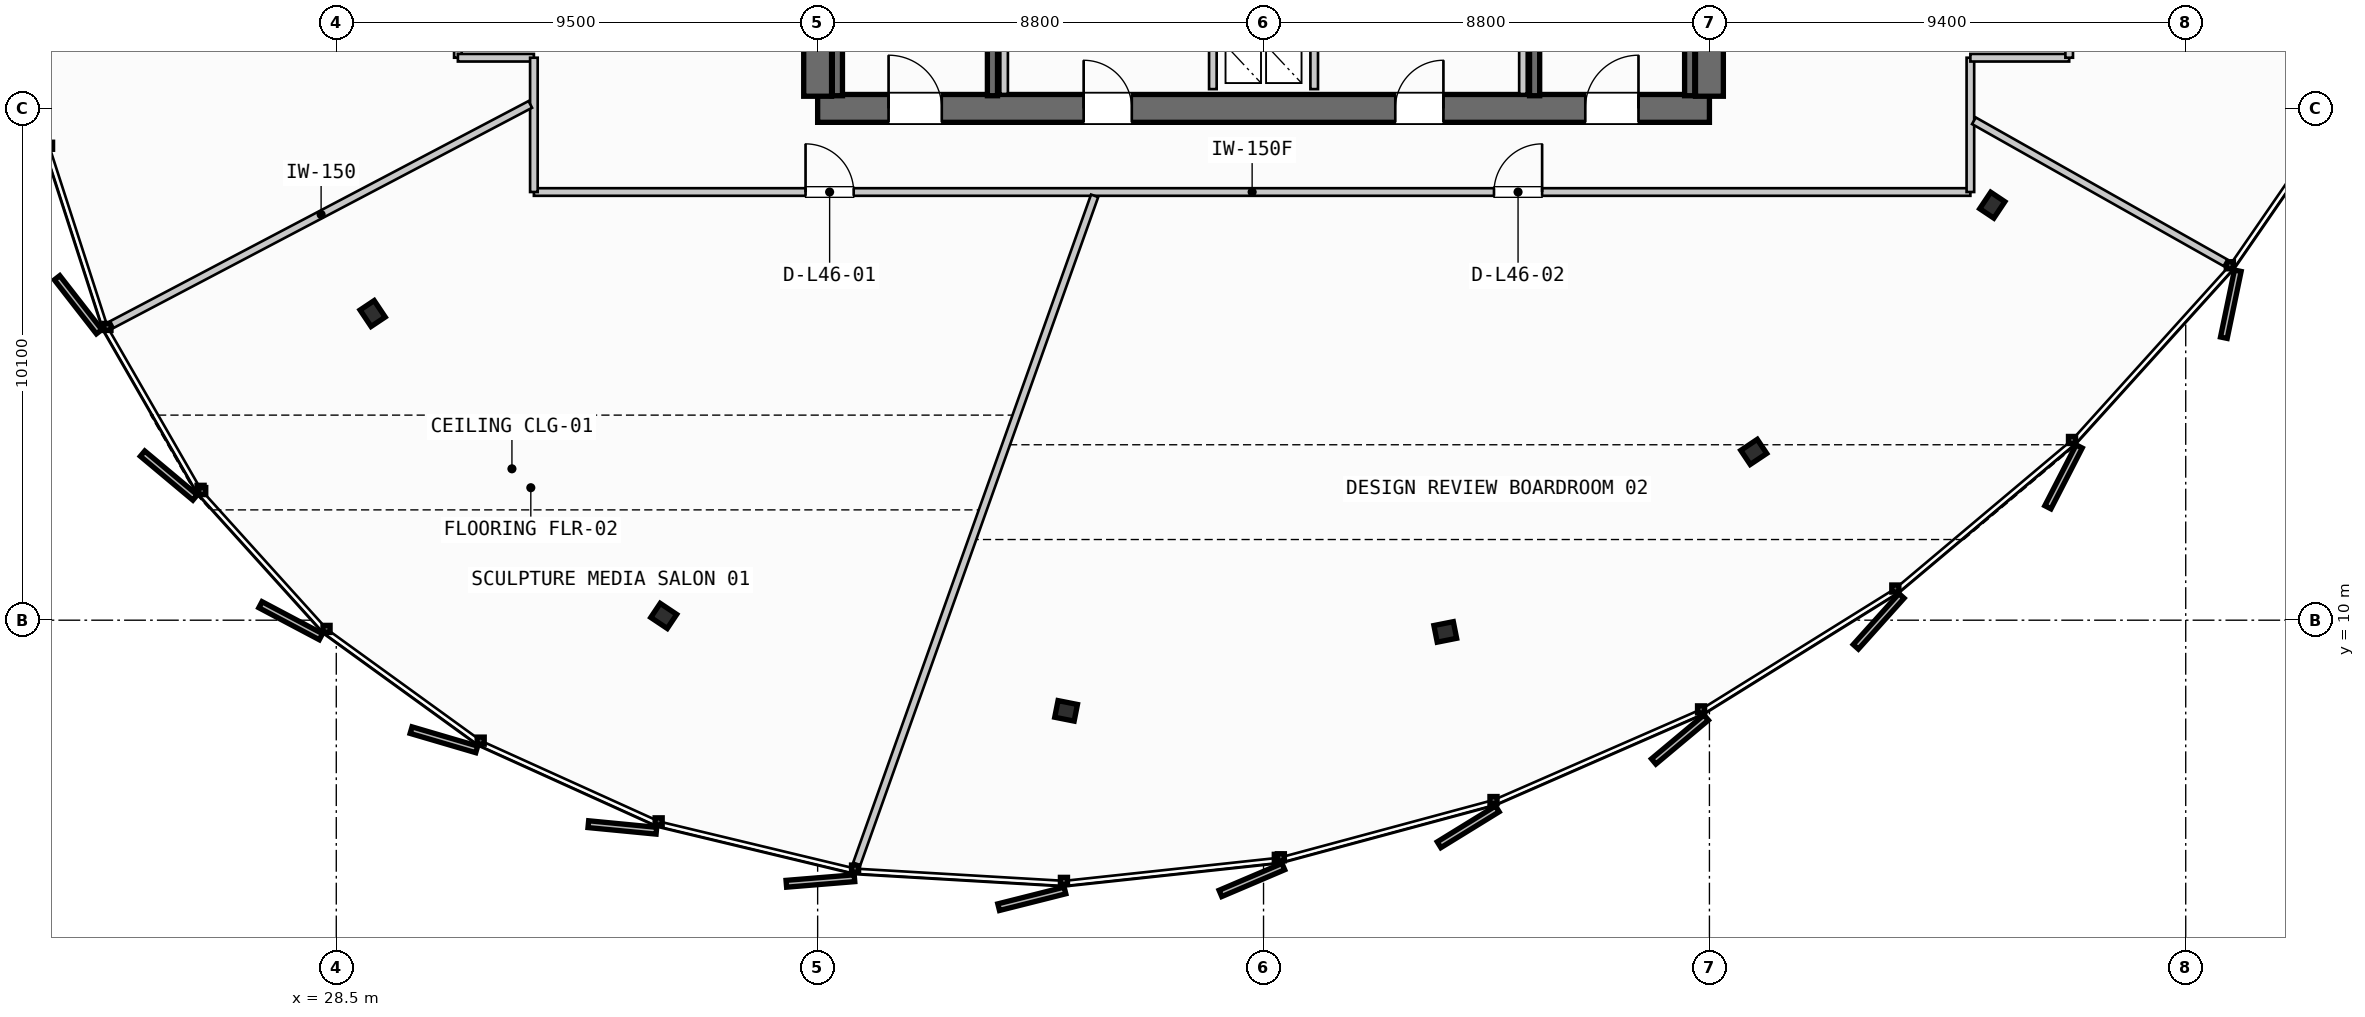
"""IFC4 building model, lengths in metres.
Left out: names, types, materials, properties, quantities, classifications, styles, units other than length and angle.
Written with IfcOpenShell. Run it as: python <this file> out.ifc"""

import sys

from ifc_helpers import new_model, si_unit, direction, frame, frame_2d, origin, origin_2d, place, context, subcontext, project, spatial, rectangle, i_section, extrude, source, transform, mapped, element, fill, save


model = new_model("IFC4")
c1 = context("Model", 3, precision=1e-05, world=origin(), true_north=direction((0.0, 1.0)))
c2 = subcontext(c1, "Body", "Model", "MODEL_VIEW")
j1 = project(units=[si_unit("LENGTHUNIT", "METRE"), si_unit("PLANEANGLEUNIT", "RADIAN")], contexts=[c1])
p1 = place(None, origin())
s1 = spatial("IfcSite", under=j1, at=p1, CompositionType="ELEMENT")
p2 = place(p1, origin())
s2 = spatial("IfcBuilding", under=s1, at=p2, CompositionType="ELEMENT")
p3 = place(p2, frame((0.0, 0.0, 179.9)))
s3 = spatial("IfcBuildingStorey", under=s2, at=p3, CompositionType="ELEMENT", Elevation=179.9)
p4 = place(p3, frame((38.0, 20.1, 0.0), z_axis=(0.0, 0.0, 1.0), x_axis=(1.0, 0.0, 0.0)))
e1 = element("IfcWall", 1, at=p4, inside=s3, PredefinedType="SHEAR", context=c2, shape_type="SweptSolid", body=[
    extrude(rectangle(XDim=17.6, YDim=0.55, at=frame_2d((8.8, 0.0))), origin(), (0.0, 0.0, 1.0), 3.26),
])
p5 = place(p4, frame((1.4, 0.0, 0.0)))
e2 = element("IfcOpeningElement", 2, at=p5, cuts=e1, PredefinedType="OPENING", context=c2, shape_type="SweptSolid", body=[
    extrude(rectangle(XDim=1.05, YDim=2.15, at=frame_2d((0.525, 1.075))), frame((0.0, 0.285, 0.0), z_axis=(0.0, -1.0, 0.0), x_axis=(1.0, 0.0, 0.0)), (0.0, 0.0, 1.0), 0.57),
])
p6 = place(p4, frame((15.15, 0.0, 0.0)))
e3 = element("IfcOpeningElement", 3, at=p6, cuts=e1, PredefinedType="OPENING", context=c2, shape_type="SweptSolid", body=[
    extrude(rectangle(XDim=1.05, YDim=2.15, at=frame_2d((0.525, 1.075))), frame((0.0, 0.285, 0.0), z_axis=(0.0, -1.0, 0.0), x_axis=(1.0, 0.0, 0.0)), (0.0, 0.0, 1.0), 0.57),
])
p7 = place(p4, frame((5.25, 0.0, 0.0)))
e4 = element("IfcOpeningElement", 4, at=p7, cuts=e1, PredefinedType="OPENING", context=c2, shape_type="SweptSolid", body=[
    extrude(rectangle(XDim=0.95, YDim=2.15, at=frame_2d((0.475, 1.075))), frame((0.0, 0.285, 0.0), z_axis=(0.0, -1.0, 0.0), x_axis=(1.0, 0.0, 0.0)), (0.0, 0.0, 1.0), 0.57),
])
p8 = place(p4, frame((11.4, 0.0, 0.0)))
e5 = element("IfcOpeningElement", 5, at=p8, cuts=e1, PredefinedType="OPENING", context=c2, shape_type="SweptSolid", body=[
    extrude(rectangle(XDim=0.95, YDim=2.15, at=frame_2d((0.475, 1.075))), frame((0.0, 0.285, 0.0), z_axis=(0.0, -1.0, 0.0), x_axis=(1.0, 0.0, 0.0)), (0.0, 0.0, 1.0), 0.57),
])
p9 = place(p3, frame((38.0, 35.26, 0.0), z_axis=(0.0, 0.0, 1.0), x_axis=(0.0, -1.0, 0.0)))
e6 = element("IfcWall", 6, at=p9, inside=s3, PredefinedType="SHEAR", context=c2, shape_type="SweptSolid", body=[
    extrude(rectangle(XDim=14.92, YDim=0.55, at=frame_2d((7.46, 0.0))), origin(), (0.0, 0.0, 1.0), 3.26),
])
p10 = place(p9, frame((5.21, 0.0, 0.0)))
e7 = element("IfcOpeningElement", 7, at=p10, cuts=e6, PredefinedType="OPENING", context=c2, shape_type="SweptSolid", body=[
    extrude(rectangle(XDim=1.1, YDim=2.2, at=frame_2d((0.55, 1.1))), frame((0.0, 0.285, 0.0), z_axis=(0.0, -1.0, 0.0), x_axis=(1.0, 0.0, 0.0)), (0.0, 0.0, 1.0), 0.57),
])
p11 = place(p3, frame((55.6, 20.34, 0.0), z_axis=(0.0, 0.0, 1.0), x_axis=(0.0, 1.0, 0.0)))
e8 = element("IfcWall", 8, at=p11, inside=s3, PredefinedType="SHEAR", context=c2, shape_type="SweptSolid", body=[
    extrude(rectangle(XDim=14.92, YDim=0.55, at=frame_2d((7.46, 0.0))), origin(), (0.0, 0.0, 1.0), 3.26),
])
p12 = place(p11, frame((12.71, 0.0, 0.0)))
e9 = element("IfcOpeningElement", 9, at=p12, cuts=e8, PredefinedType="OPENING", context=c2, shape_type="SweptSolid", body=[
    extrude(rectangle(XDim=1.05, YDim=2.15, at=frame_2d((0.525, 1.075))), frame((0.0, 0.285, 0.0), z_axis=(0.0, -1.0, 0.0), x_axis=(1.0, 0.0, 0.0)), (0.0, 0.0, 1.0), 0.57),
])
p13 = place(p11, frame((8.61, 0.0, 0.0)))
e10 = element("IfcOpeningElement", 10, at=p13, cuts=e8, PredefinedType="OPENING", context=c2, shape_type="SweptSolid", body=[
    extrude(rectangle(XDim=1.1, YDim=2.2, at=frame_2d((0.55, 1.1))), frame((0.0, 0.285, 0.0), z_axis=(0.0, -1.0, 0.0), x_axis=(1.0, 0.0, 0.0)), (0.0, 0.0, 1.0), 0.57),
])
m1 = source(origin(), c2, "Body", "SweptSolid", [
    extrude(i_section(OverallWidth=0.391, OverallDepth=0.335, WebThickness=0.023, FlangeThickness=0.034, FilletRadius=0.015, at=origin_2d()), origin(), (0.0, 0.0, 1.0), 3.26),
])
for number, where, z_axis, x_axis in (
    (11, (29.218, 16.052, 0.0), (0.0, 0.0, 1.0), (-0.831, -0.556, 0.0)),
    (12, (34.963, 10.084, 0.0), (0.0, 0.0, 1.0), (-0.556, -0.831, 0.0)),
    (13, (42.904, 8.211, 0.0), (0.0, 0.0, 1.0), (-0.195, -0.981, 0.0)),
    (14, (50.387, 9.769, 0.0), (0.0, 0.0, 1.0), (0.195, -0.981, 0.0)),
    (15, (56.475, 13.321, 0.0), (0.0, 0.0, 1.0), (0.556, -0.831, 0.0)),
    (16, (61.183, 18.19, 0.0), (0.0, 0.0, 1.0), (0.831, -0.556, 0.0)),
):
    element("IfcColumn", number, at=place(p3, frame(where, z_axis=z_axis, x_axis=x_axis)), inside=s3, PredefinedType="COLUMN", context=c2, shape_type="MappedRepresentation", body=[
        mapped(m1, transform((0.0, 0.0, 0.0), scale=1.0)),
    ])
for number, where, z_axis, x_axis in (
    (17, (41.45, 27.7, 0.0), (0.0, 0.0, 1.0), (0.0, -1.0, 0.0)),
    (18, (38.39, 20.35, 0.0), (0.0, 0.0, 1.0), (0.0, 1.0, 0.0)),
    (19, (55.21, 27.7, 0.0), (0.0, 0.0, 1.0), (0.0, -1.0, 0.0)),
    (20, (52.15, 20.35, 0.0), (0.0, 0.0, 1.0), (0.0, 1.0, 0.0)),
):
    element("IfcWall", number, at=place(p3, frame(where, z_axis=z_axis, x_axis=x_axis)), inside=s3, PredefinedType="SHEAR", context=c2, shape_type="SweptSolid", body=[
        extrude(rectangle(XDim=7.35, YDim=0.2, at=frame_2d((3.675, 0.0))), origin(), (0.0, 0.0, 1.0), 3.26),
    ])
for number, where, z_axis, x_axis in (
    (21, (45.8, 20.48, 0.0), (0.0, 0.0, 1.0), (0.0, 1.0, 0.0)),
    (22, (47.8, 20.48, 0.0), (0.0, 0.0, 1.0), (0.0, 1.0, 0.0)),
):
    element("IfcWall", number, at=place(p3, frame(where, z_axis=z_axis, x_axis=x_axis)), inside=s3, PredefinedType="PARTITIONING", context=c2, shape_type="SweptSolid", body=[
        extrude(rectangle(XDim=2.24, YDim=0.15, at=frame_2d((1.12, 0.0))), origin(), (0.0, 0.0, 1.0), 2.28),
    ])
for number, where, z_axis, x_axis in (
    (23, (41.68, 20.385, 0.0), (0.0, 0.0, 1.0), (0.0, 1.0, 0.0)),
    (24, (51.92, 20.385, 0.0), (0.0, 0.0, 1.0), (0.0, 1.0, 0.0)),
):
    element("IfcWall", number, at=place(p3, frame(where, z_axis=z_axis, x_axis=x_axis)), inside=s3, PredefinedType="PARTITIONING", context=c2, shape_type="SweptSolid", body=[
        extrude(rectangle(XDim=2.345, YDim=0.15, at=frame_2d((1.172, 0.0))), origin(), (0.0, 0.0, 1.0), 2.28),
    ])
p14 = place(p3, frame((32.4, 18.45, 0.0), z_axis=(0.0, 0.0, 1.0), x_axis=(1.0, 0.0, 0.0)))
e25 = element("IfcWall", 25, at=p14, inside=s3, PredefinedType="PARTITIONING", context=c2, shape_type="SweptSolid", body=[
    extrude(rectangle(XDim=28.35, YDim=0.15, at=frame_2d((14.175, 0.0))), origin(), (0.0, 0.0, 1.0), 2.28),
])
p15 = place(p14, frame((5.362, 0.0, 0.0)))
e26 = element("IfcOpeningElement", 26, at=p15, cuts=e25, PredefinedType="OPENING", context=c2, shape_type="SweptSolid", body=[
    extrude(rectangle(XDim=0.95, YDim=2.15, at=frame_2d((0.475, 1.075))), frame((0.0, 0.085, 0.0), z_axis=(0.0, -1.0, 0.0), x_axis=(1.0, 0.0, 0.0)), (0.0, 0.0, 1.0), 0.17),
])
p16 = place(p14, frame((18.948, 0.0, 0.0)))
e27 = element("IfcOpeningElement", 27, at=p16, cuts=e25, PredefinedType="OPENING", context=c2, shape_type="SweptSolid", body=[
    extrude(rectangle(XDim=0.95, YDim=2.15, at=frame_2d((0.475, 1.075))), frame((0.0, 0.085, 0.0), z_axis=(0.0, -1.0, 0.0), x_axis=(1.0, 0.0, 0.0)), (0.0, 0.0, 1.0), 0.17),
])
p17 = place(p3, frame((60.75, 18.45, 0.0), z_axis=(0.0, 0.0, 1.0), x_axis=(0.0, 1.0, 0.0)))
e28 = element("IfcWall", 28, at=p17, inside=s3, PredefinedType="PARTITIONING", context=c2, shape_type="SweptSolid", body=[
    extrude(rectangle(XDim=2.65, YDim=0.15, at=frame_2d((1.325, 0.0))), origin(), (0.0, 0.0, 1.0), 2.28),
])
p18 = place(p3, frame((60.75, 21.1, 0.0), z_axis=(0.0, 0.0, 1.0), x_axis=(1.0, 0.0, 0.0)))
e29 = element("IfcWall", 29, at=p18, inside=s3, PredefinedType="PARTITIONING", context=c2, shape_type="SweptSolid", body=[
    extrude(rectangle(XDim=1.95, YDim=0.15, at=frame_2d((0.975, 0.0))), origin(), (0.0, 0.0, 1.0), 2.28),
])
for number, where, z_axis, x_axis in (
    (30, (62.7, 21.1, 0.0), (0.0, 0.0, 1.0), (0.0, 1.0, 0.0)),
    (31, (30.9, 22.8, 0.0), (0.0, 0.0, 1.0), (0.0, -1.0, 0.0)),
):
    element("IfcWall", number, at=place(p3, frame(where, z_axis=z_axis, x_axis=x_axis)), inside=s3, PredefinedType="PARTITIONING", context=c2, shape_type="SweptSolid", body=[
        extrude(rectangle(XDim=1.7, YDim=0.15, at=frame_2d((0.85, 0.0))), origin(), (0.0, 0.0, 1.0), 2.28),
    ])
p19 = place(p3, frame((30.9, 21.1, 0.0), z_axis=(0.0, 0.0, 1.0), x_axis=(1.0, 0.0, 0.0)))
e32 = element("IfcWall", 32, at=p19, inside=s3, PredefinedType="PARTITIONING", context=c2, shape_type="SweptSolid", body=[
    extrude(rectangle(XDim=1.5, YDim=0.15, at=frame_2d((0.75, 0.0))), origin(), (0.0, 0.0, 1.0), 2.28),
])
p20 = place(p3, frame((32.4, 21.1, 0.0), z_axis=(0.0, 0.0, 1.0), x_axis=(0.0, -1.0, 0.0)))
e33 = element("IfcWall", 33, at=p20, inside=s3, PredefinedType="PARTITIONING", context=c2, shape_type="SweptSolid", body=[
    extrude(rectangle(XDim=2.65, YDim=0.15, at=frame_2d((1.325, 0.0))), origin(), (0.0, 0.0, 1.0), 2.28),
])
p21 = place(p3, frame((32.329, 20.178, 0.0), z_axis=(0.0, 0.0, 1.0), x_axis=(-0.884982922919, -0.465623481089, 0.0)))
e34 = element("IfcWall", 34, at=p21, inside=s3, PredefinedType="PARTITIONING", context=c2, shape_type="SweptSolid", body=[
    extrude(rectangle(XDim=9.33, YDim=0.15, at=frame_2d((4.665, 0.0))), origin(), (0.0, 0.0, 1.0), 2.28),
])
p22 = place(p3, frame((43.466, 18.375, 0.0), z_axis=(0.0, 0.0, 1.0), x_axis=(-0.335449855231, -0.942058063298, 0.0)))
e35 = element("IfcWall", 35, at=p22, inside=s3, PredefinedType="PARTITIONING", context=c2, shape_type="SweptSolid", body=[
    extrude(rectangle(XDim=13.993, YDim=0.15, at=frame_2d((6.997, 0.0))), origin(), (0.0, 0.0, 1.0), 2.28),
])
p23 = place(p3, frame((60.82, 19.856, 0.0), z_axis=(0.0, 0.0, 1.0), x_axis=(0.870840276809, -0.491566081303, 0.0)))
e36 = element("IfcWall", 36, at=p23, inside=s3, PredefinedType="PARTITIONING", context=c2, shape_type="SweptSolid", body=[
    extrude(rectangle(XDim=5.701, YDim=0.15, at=frame_2d((2.85, 0.0))), origin(), (0.0, 0.0, 1.0), 2.28),
])
m2 = source(origin(), c2, "Body", "SweptSolid", [
    extrude(rectangle(XDim=1.05, YDim=2.15, at=frame_2d((0.525, 1.075))), frame((0.0, 0.025, 0.0), z_axis=(0.0, -1.0, 0.0), x_axis=(1.0, 0.0, 0.0)), (0.0, 0.0, 1.0), 0.05),
])
p24 = place(p5, origin())
e37 = element("IfcDoor", 37, at=p24, inside=s3, OperationType="SINGLE_SWING_LEFT", PredefinedType="DOOR", context=c2, shape_type="MappedRepresentation", body=[
    mapped(m2, transform((0.0, 0.0, 0.0), scale=1.0)),
])
fill(e2, e37)
p25 = place(p6, origin())
e38 = element("IfcDoor", 38, at=p25, inside=s3, OperationType="SINGLE_SWING_RIGHT", PredefinedType="DOOR", context=c2, shape_type="MappedRepresentation", body=[
    mapped(m2, transform((0.0, 0.0, 0.0), scale=1.0)),
])
fill(e3, e38)
m3 = source(origin(), c2, "Body", "SweptSolid", [
    extrude(rectangle(XDim=0.95, YDim=2.15, at=frame_2d((0.475, 1.075))), frame((0.0, 0.025, 0.0), z_axis=(0.0, -1.0, 0.0), x_axis=(1.0, 0.0, 0.0)), (0.0, 0.0, 1.0), 0.05),
])
p26 = place(p7, origin())
e39 = element("IfcDoor", 39, at=p26, inside=s3, OperationType="SINGLE_SWING_LEFT", PredefinedType="DOOR", context=c2, shape_type="MappedRepresentation", body=[
    mapped(m3, transform((0.0, 0.0, 0.0), scale=1.0)),
])
fill(e4, e39)
p27 = place(p8, origin())
e40 = element("IfcDoor", 40, at=p27, inside=s3, OperationType="SINGLE_SWING_RIGHT", PredefinedType="DOOR", context=c2, shape_type="MappedRepresentation", body=[
    mapped(m3, transform((0.0, 0.0, 0.0), scale=1.0)),
])
fill(e5, e40)
p28 = place(p15, origin())
e41 = element("IfcDoor", 41, at=p28, inside=s3, OperationType="SINGLE_SWING_LEFT", PredefinedType="DOOR", context=c2, shape_type="MappedRepresentation", body=[
    mapped(m3, transform((0.0, 0.0, 0.0), scale=1.0)),
])
fill(e26, e41)
p29 = place(p16, origin())
e42 = element("IfcDoor", 42, at=p29, inside=s3, OperationType="SINGLE_SWING_RIGHT", PredefinedType="DOOR", context=c2, shape_type="MappedRepresentation", body=[
    mapped(m3, transform((0.0, 0.0, 0.0), scale=1.0)),
])
fill(e27, e42)
save(model, sys.argv[1])
